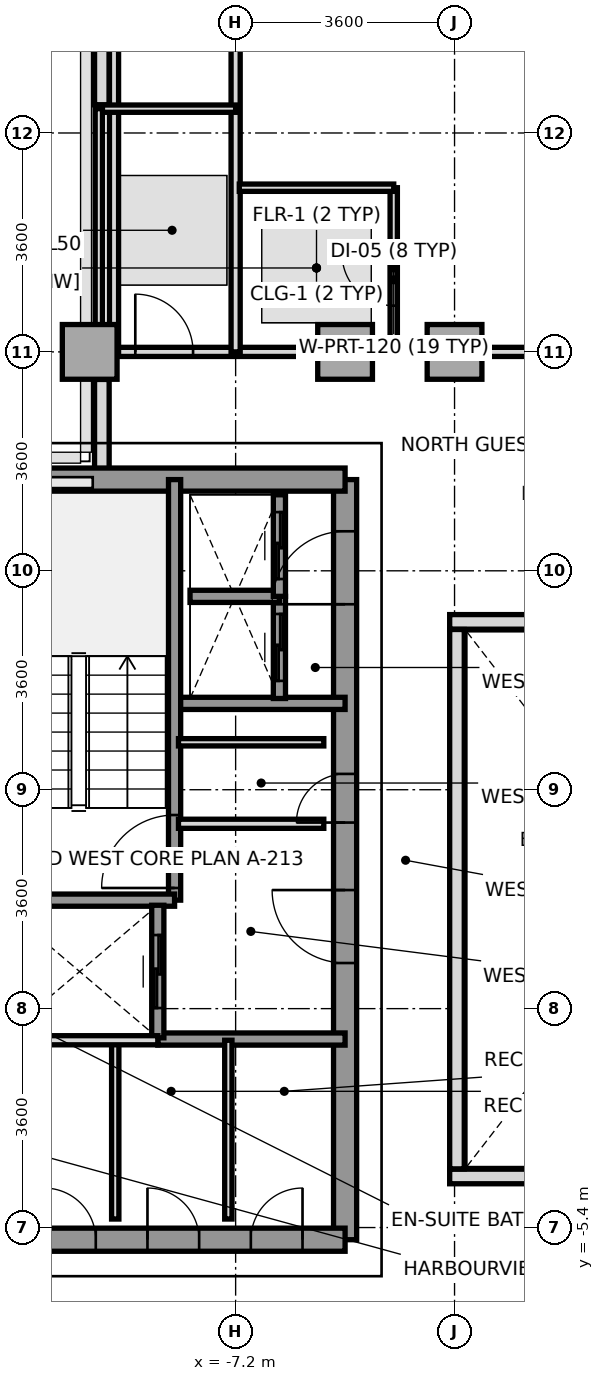
"""IFC4 building model, lengths in metres.
Left out: names, types, materials, properties, quantities, classifications, styles, units other than length and angle.
Written with IfcOpenShell. Run it as: python <this file> out.ifc"""

import sys

from ifc_helpers import new_model, si_unit, direction, frame, frame_2d, origin, origin_2d, place, context, subcontext, project, spatial, rectangle, extrude, source, transform, mapped, element, fill, save


model = new_model("IFC4")
c1 = context("Model", 3, precision=1e-05, world=origin(), true_north=direction((0.0, 1.0)))
c2 = subcontext(c1, "Body", "Model", "MODEL_VIEW")
j1 = project(units=[si_unit("LENGTHUNIT", "METRE"), si_unit("PLANEANGLEUNIT", "RADIAN")], contexts=[c1])
p1 = place(None, origin())
s1 = spatial("IfcSite", under=j1, at=p1, CompositionType="ELEMENT")
p2 = place(p1, origin())
s2 = spatial("IfcBuilding", under=s1, at=p2, CompositionType="ELEMENT")
p3 = place(p2, frame((0.0, 0.0, 184.2)))
s3 = spatial("IfcBuildingStorey", under=s2, at=p3, CompositionType="ELEMENT", Elevation=184.2)
m1 = source(origin(), c2, "Body", "SweptSolid", [
    extrude(rectangle(XDim=0.9, YDim=0.9, at=origin_2d()), origin(), (0.0, 0.0, 1.0), 3.2),
])
for number, where, z_axis, x_axis in (
    (1, (-9.6, 9.0, 0.0), (0.0, 0.0, 1.0), (1.0, 0.0, 0.0)),
    (2, (-5.4, 9.0, 0.0), (0.0, 0.0, 1.0), (1.0, 0.0, 0.0)),
    (3, (-3.6, 9.0, 0.0), (0.0, 0.0, 1.0), (1.0, 0.0, 0.0)),
):
    element("IfcColumn", number, at=place(p3, frame(where, z_axis=z_axis, x_axis=x_axis)), inside=s3, PredefinedType="COLUMN", context=c2, shape_type="MappedRepresentation", body=[
        mapped(m1, transform((0.0, 0.0, 0.0), x_axis=(1.0, 0.0, 0.0), y_axis=(0.0, 1.0, 0.0), z_axis=(0.0, 0.0, 1.0), scale=1.0)),
    ])
p4 = place(p3, frame((-9.4, 6.953, 0.0), z_axis=(0.0, 0.0, 1.0), x_axis=(0.0, 1.0, 0.0)))
e4 = element("IfcWall", 4, at=p4, inside=s3, PredefinedType="PARAPET", context=c2, shape_type="SweptSolid", body=[
    extrude(rectangle(XDim=1.594, YDim=0.24, at=frame_2d((0.797, 0.0))), origin(), (0.0, 0.0, 1.0), 1.15),
])
p5 = place(p3, frame((-9.4, 13.063, 0.0), z_axis=(0.0, 0.0, 1.0), x_axis=(0.0, 1.0, 0.0)))
e5 = element("IfcWall", 5, at=p5, inside=s3, PredefinedType="PARAPET", context=c2, shape_type="SweptSolid", body=[
    extrude(rectangle(XDim=2.54, YDim=0.24, at=frame_2d((1.27, 0.0))), origin(), (0.0, 0.0, 1.0), 1.15),
])
p6 = place(p3, frame((-5.4, -5.6, 0.0), z_axis=(0.0, 0.0, 1.0), x_axis=(0.0, 1.0, 0.0)))
e6 = element("IfcWall", 6, at=p6, inside=s3, PredefinedType="SHEAR", context=c2, shape_type="SweptSolid", body=[
    extrude(rectangle(XDim=12.5, YDim=0.38, at=frame_2d((6.25, 0.0))), origin(), (0.0, 0.0, 1.0), 3.2),
])
p7 = place(p6, frame((4.55, 0.0, 0.0)))
e7 = element("IfcOpeningElement", 7, at=p7, cuts=e6, PredefinedType="OPENING", context=c2, shape_type="SweptSolid", body=[
    extrude(rectangle(XDim=1.2, YDim=2.2, at=frame_2d((0.6, 1.1))), frame((0.0, 0.2, 0.0), z_axis=(0.0, -1.0, 0.0), x_axis=(1.0, 0.0, 0.0)), (0.0, 0.0, 1.0), 0.4),
])
p8 = place(p6, frame((10.45, 0.0, 0.0)))
e8 = element("IfcOpeningElement", 8, at=p8, cuts=e6, PredefinedType="OPENING", context=c2, shape_type="SweptSolid", body=[
    extrude(rectangle(XDim=1.2, YDim=2.2, at=frame_2d((0.6, 1.1))), frame((0.0, 0.2, 0.0), z_axis=(0.0, -1.0, 0.0), x_axis=(1.0, 0.0, 0.0)), (0.0, 0.0, 1.0), 0.4),
])
p9 = place(p6, frame((6.86, 0.0, 0.0)))
e9 = element("IfcOpeningElement", 9, at=p9, cuts=e6, PredefinedType="OPENING", context=c2, shape_type="SweptSolid", body=[
    extrude(rectangle(XDim=0.8, YDim=2.1, at=frame_2d((0.4, 1.05))), frame((0.0, 0.2, 0.0), z_axis=(0.0, -1.0, 0.0), x_axis=(1.0, 0.0, 0.0)), (0.0, 0.0, 1.0), 0.4),
])
p10 = place(p3, frame((-11.356, 6.9, 0.0), z_axis=(0.0, 0.0, 1.0), x_axis=(1.0, 0.0, 0.0)))
e10 = element("IfcWall", 10, at=p10, inside=s3, PredefinedType="SHEAR", context=c2, shape_type="SweptSolid", body=[
    extrude(rectangle(XDim=5.956, YDim=0.38, at=frame_2d((2.978, 0.0))), origin(), (0.0, 0.0, 1.0), 3.2),
])
p11 = place(p3, frame((-13.2, -5.6, 0.0), z_axis=(0.0, 0.0, 1.0), x_axis=(1.0, 0.0, 0.0)))
e11 = element("IfcWall", 11, at=p11, inside=s3, PredefinedType="SHEAR", context=c2, shape_type="SweptSolid", body=[
    extrude(rectangle(XDim=7.8, YDim=0.38, at=frame_2d((3.9, 0.0))), origin(), (0.0, 0.0, 1.0), 3.2),
])
p12 = place(p11, frame((0.28, 0.0, 0.0)))
e12 = element("IfcOpeningElement", 12, at=p12, cuts=e11, PredefinedType="OPENING", context=c2, shape_type="SweptSolid", body=[
    extrude(rectangle(XDim=0.85, YDim=2.1, at=frame_2d((0.425, 1.05))), frame((0.0, 0.2, 0.0), z_axis=(0.0, -1.0, 0.0), x_axis=(1.0, 0.0, 0.0)), (0.0, 0.0, 1.0), 0.4),
])
p13 = place(p11, frame((1.36, 0.0, 0.0)))
e13 = element("IfcOpeningElement", 13, at=p13, cuts=e11, PredefinedType="OPENING", context=c2, shape_type="SweptSolid", body=[
    extrude(rectangle(XDim=0.85, YDim=2.1, at=frame_2d((0.425, 1.05))), frame((0.0, 0.2, 0.0), z_axis=(0.0, -1.0, 0.0), x_axis=(1.0, 0.0, 0.0)), (0.0, 0.0, 1.0), 0.4),
])
p14 = place(p11, frame((2.85, 0.0, 0.0)))
e14 = element("IfcOpeningElement", 14, at=p14, cuts=e11, PredefinedType="OPENING", context=c2, shape_type="SweptSolid", body=[
    extrude(rectangle(XDim=0.85, YDim=2.1, at=frame_2d((0.425, 1.05))), frame((0.0, 0.2, 0.0), z_axis=(0.0, -1.0, 0.0), x_axis=(1.0, 0.0, 0.0)), (0.0, 0.0, 1.0), 0.4),
])
p15 = place(p11, frame((4.55, 0.0, 0.0)))
e15 = element("IfcOpeningElement", 15, at=p15, cuts=e11, PredefinedType="OPENING", context=c2, shape_type="SweptSolid", body=[
    extrude(rectangle(XDim=0.85, YDim=2.1, at=frame_2d((0.425, 1.05))), frame((0.0, 0.2, 0.0), z_axis=(0.0, -1.0, 0.0), x_axis=(1.0, 0.0, 0.0)), (0.0, 0.0, 1.0), 0.4),
])
p16 = place(p11, frame((6.25, 0.0, 0.0)))
e16 = element("IfcOpeningElement", 16, at=p16, cuts=e11, PredefinedType="OPENING", context=c2, shape_type="SweptSolid", body=[
    extrude(rectangle(XDim=0.85, YDim=2.1, at=frame_2d((0.425, 1.05))), frame((0.0, 0.2, 0.0), z_axis=(0.0, -1.0, 0.0), x_axis=(1.0, 0.0, 0.0)), (0.0, 0.0, 1.0), 0.4),
])
p17 = place(p3, frame((-8.18, 3.22, 0.0), z_axis=(0.0, 0.0, 1.0), x_axis=(1.0, 0.0, 0.0)))
e17 = element("IfcWall", 17, at=p17, inside=s3, PredefinedType="SOLIDWALL", context=c2, shape_type="SweptSolid", body=[
    extrude(rectangle(XDim=2.78, YDim=0.2, at=frame_2d((1.39, 0.0))), origin(), (0.0, 0.0, 1.0), 3.2),
])
p18 = place(p3, frame((-8.48, -2.3, 0.0), z_axis=(0.0, 0.0, 1.0), x_axis=(1.0, 0.0, 0.0)))
e18 = element("IfcWall", 18, at=p18, inside=s3, PredefinedType="SOLIDWALL", context=c2, shape_type="SweptSolid", body=[
    extrude(rectangle(XDim=3.08, YDim=0.2, at=frame_2d((1.54, 0.0))), origin(), (0.0, 0.0, 1.0), 3.2),
])
p19 = place(p3, frame((-8.204, -0.016, 0.0), z_axis=(0.0, 0.0, 1.0), x_axis=(0.0, 1.0, 0.0)))
e19 = element("IfcWall", 19, at=p19, inside=s3, PredefinedType="SOLIDWALL", context=c2, shape_type="SweptSolid", body=[
    extrude(rectangle(XDim=6.916, YDim=0.2, at=frame_2d((3.458, 0.0))), origin(), (0.0, 0.0, 1.0), 3.2),
])
p20 = place(p19, frame((0.2, 0.0, 0.0)))
e20 = element("IfcOpeningElement", 20, at=p20, cuts=e19, PredefinedType="OPENING", context=c2, shape_type="SweptSolid", body=[
    extrude(rectangle(XDim=1.2, YDim=2.2, at=frame_2d((0.6, 1.1))), frame((0.0, 0.11, 0.0), z_axis=(0.0, -1.0, 0.0), x_axis=(1.0, 0.0, 0.0)), (0.0, 0.0, 1.0), 0.22),
])
p21 = place(p3, frame((-11.356, -0.016, 0.0), z_axis=(0.0, 0.0, 1.0), x_axis=(1.0, 0.0, 0.0)))
e21 = element("IfcWall", 21, at=p21, inside=s3, PredefinedType="SOLIDWALL", context=c2, shape_type="SweptSolid", body=[
    extrude(rectangle(XDim=3.152, YDim=0.2, at=frame_2d((1.576, 0.0))), origin(), (0.0, 0.0, 1.0), 3.2),
])
p22 = place(p3, frame((-8.48, -2.28, 0.0), z_axis=(0.0, 0.0, 1.0), x_axis=(0.0, 1.0, 0.0)))
e22 = element("IfcWall", 22, at=p22, inside=s3, PredefinedType="SOLIDWALL", context=c2, shape_type="SweptSolid", body=[
    extrude(rectangle(XDim=2.18, YDim=0.2, at=frame_2d((1.09, 0.0))), origin(), (0.0, 0.0, 1.0), 3.2),
])
p23 = place(p22, frame((0.49, 0.0, 0.0)))
e23 = element("IfcOpeningElement", 23, at=p23, cuts=e22, PredefinedType="OPENING", context=c2, shape_type="SweptSolid", body=[
    extrude(rectangle(XDim=1.2, YDim=2.2, at=frame_2d((0.6, 1.1))), frame((0.0, 0.11, 0.0), z_axis=(0.0, -1.0, 0.0), x_axis=(1.0, 0.0, 0.0)), (0.0, 0.0, 1.0), 0.22),
])
p24 = place(p3, frame((-6.48, 3.3, 0.0), z_axis=(0.0, 0.0, 1.0), x_axis=(0.0, 1.0, 0.0)))
e24 = element("IfcWall", 24, at=p24, inside=s3, PredefinedType="SOLIDWALL", context=c2, shape_type="SweptSolid", body=[
    extrude(rectangle(XDim=1.68, YDim=0.2, at=frame_2d((0.84, 0.0))), origin(), (0.0, 0.0, 1.0), 3.2),
])
p25 = place(p24, frame((0.29, 0.0, 0.0)))
e25 = element("IfcOpeningElement", 25, at=p25, cuts=e24, PredefinedType="OPENING", context=c2, shape_type="SweptSolid", body=[
    extrude(rectangle(XDim=1.1, YDim=2.2, at=frame_2d((0.55, 1.1))), frame((0.0, 0.11, 0.0), z_axis=(0.0, -1.0, 0.0), x_axis=(1.0, 0.0, 0.0)), (0.0, 0.0, 1.0), 0.22),
])
p26 = place(p3, frame((-7.95, 4.98, 0.0), z_axis=(0.0, 0.0, 1.0), x_axis=(1.0, 0.0, 0.0)))
e26 = element("IfcWall", 26, at=p26, inside=s3, PredefinedType="SOLIDWALL", context=c2, shape_type="SweptSolid", body=[
    extrude(rectangle(XDim=1.47, YDim=0.2, at=frame_2d((0.735, 0.0))), origin(), (0.0, 0.0, 1.0), 3.2),
])
p27 = place(p3, frame((-6.48, 4.98, 0.0), z_axis=(0.0, 0.0, 1.0), x_axis=(0.0, 1.0, 0.0)))
e27 = element("IfcWall", 27, at=p27, inside=s3, PredefinedType="SOLIDWALL", context=c2, shape_type="SweptSolid", body=[
    extrude(rectangle(XDim=1.67, YDim=0.2, at=frame_2d((0.835, 0.0))), origin(), (0.0, 0.0, 1.0), 3.2),
])
p28 = place(p27, frame((0.285, 0.0, 0.0)))
e28 = element("IfcOpeningElement", 28, at=p28, cuts=e27, PredefinedType="OPENING", context=c2, shape_type="SweptSolid", body=[
    extrude(rectangle(XDim=1.1, YDim=2.2, at=frame_2d((0.55, 1.1))), frame((0.0, 0.11, 0.0), z_axis=(0.0, -1.0, 0.0), x_axis=(1.0, 0.0, 0.0)), (0.0, 0.0, 1.0), 0.22),
])
p29 = place(p3, frame((-8.14, 1.24, 0.0), z_axis=(0.0, 0.0, 1.0), x_axis=(1.0, 0.0, 0.0)))
e29 = element("IfcWall", 29, at=p29, inside=s3, PredefinedType="PARTITIONING", context=c2, shape_type="SweptSolid", body=[
    extrude(rectangle(XDim=2.39, YDim=0.15, at=frame_2d((1.195, 0.0))), origin(), (0.0, 0.0, 1.0), 2.3),
])
p30 = place(p3, frame((-8.14, 2.58, 0.0), z_axis=(0.0, 0.0, 1.0), x_axis=(1.0, 0.0, 0.0)))
e30 = element("IfcWall", 30, at=p30, inside=s3, PredefinedType="PARTITIONING", context=c2, shape_type="SweptSolid", body=[
    extrude(rectangle(XDim=2.39, YDim=0.12, at=frame_2d((1.195, 0.0))), origin(), (0.0, 0.0, 1.0), 2.3),
])
for number, where, z_axis, x_axis in (
    (31, (-9.18, -5.26, 0.0), (0.0, 0.0, 1.0), (0.0, 1.0, 0.0)),
    (32, (-7.32, -5.26, 0.0), (0.0, 0.0, 1.0), (0.0, 1.0, 0.0)),
):
    element("IfcWall", number, at=place(p3, frame(where, z_axis=z_axis, x_axis=x_axis)), inside=s3, PredefinedType="PARTITIONING", context=c2, shape_type="SweptSolid", body=[
        extrude(rectangle(XDim=2.94, YDim=0.12, at=frame_2d((1.47, 0.0))), origin(), (0.0, 0.0, 1.0), 3.2),
    ])
p31 = place(p3, frame((-11.04, -2.32, 0.0), z_axis=(0.0, 0.0, 1.0), x_axis=(1.0, 0.0, 0.0)))
e33 = element("IfcWall", 33, at=p31, inside=s3, PredefinedType="PARTITIONING", context=c2, shape_type="SweptSolid", body=[
    extrude(rectangle(XDim=2.56, YDim=0.15, at=frame_2d((1.28, 0.0))), origin(), (0.0, 0.0, 1.0), 3.2),
])
p32 = place(p3, frame((-9.55, 9.0, 0.0), z_axis=(0.0, 0.0, 1.0), x_axis=(1.0, 0.0, 0.0)))
e34 = element("IfcWall", 34, at=p32, inside=s3, PredefinedType="PARTITIONING", context=c2, shape_type="SweptSolid", body=[
    extrude(rectangle(XDim=19.1, YDim=0.15, at=frame_2d((9.55, 0.0))), origin(), (0.0, 0.0, 1.0), 2.75),
])
p33 = place(p32, frame((0.7, 0.0, 0.0)))
e35 = element("IfcOpeningElement", 35, at=p33, cuts=e34, PredefinedType="OPENING", context=c2, shape_type="SweptSolid", body=[
    extrude(rectangle(XDim=0.95, YDim=2.15, at=frame_2d((0.475, 1.075))), frame((0.0, 0.085, 0.0), z_axis=(0.0, -1.0, 0.0), x_axis=(1.0, 0.0, 0.0)), (0.0, 0.0, 1.0), 0.17),
])
p34 = place(p32, frame((7.15, 0.0, 0.0)))
e36 = element("IfcOpeningElement", 36, at=p34, cuts=e34, PredefinedType="OPENING", context=c2, shape_type="SweptSolid", body=[
    extrude(rectangle(XDim=0.95, YDim=2.15, at=frame_2d((0.475, 1.075))), frame((0.0, 0.085, 0.0), z_axis=(0.0, -1.0, 0.0), x_axis=(1.0, 0.0, 0.0)), (0.0, 0.0, 1.0), 0.17),
])
p35 = place(p32, frame((11.55, 0.0, 0.0)))
e37 = element("IfcOpeningElement", 37, at=p35, cuts=e34, PredefinedType="OPENING", context=c2, shape_type="SweptSolid", body=[
    extrude(rectangle(XDim=0.95, YDim=2.15, at=frame_2d((0.475, 1.075))), frame((0.0, 0.085, 0.0), z_axis=(0.0, -1.0, 0.0), x_axis=(1.0, 0.0, 0.0)), (0.0, 0.0, 1.0), 0.17),
])
p36 = place(p3, frame((-9.2, 9.0, 0.0), z_axis=(0.0, 0.0, 1.0), x_axis=(0.0, 1.0, 0.0)))
e38 = element("IfcWall", 38, at=p36, inside=s3, PredefinedType="PARTITIONING", context=c2, shape_type="SweptSolid", body=[
    extrude(rectangle(XDim=6.68, YDim=0.15, at=frame_2d((3.34, 0.0))), origin(), (0.0, 0.0, 1.0), 2.75),
])
p37 = place(p3, frame((-7.2, 9.0, 0.0), z_axis=(0.0, 0.0, 1.0), x_axis=(0.0, 1.0, 0.0)))
e39 = element("IfcWall", 39, at=p37, inside=s3, PredefinedType="PARTITIONING", context=c2, shape_type="SweptSolid", body=[
    extrude(rectangle(XDim=14.4, YDim=0.15, at=frame_2d((7.2, 0.0))), origin(), (0.0, 0.0, 1.0), 2.75),
])
p38 = place(p3, frame((-9.45, 13.0, 0.0), z_axis=(0.0, 0.0, 1.0), x_axis=(1.0, 0.0, 0.0)))
e40 = element("IfcWall", 40, at=p38, inside=s3, PredefinedType="PARTITIONING", context=c2, shape_type="SweptSolid", body=[
    extrude(rectangle(XDim=2.25, YDim=0.12, at=frame_2d((1.125, 0.0))), origin(), (0.0, 0.0, 1.0), 3.2),
])
p39 = place(p3, frame((-9.45, 9.0, 0.0), z_axis=(0.0, 0.0, 1.0), x_axis=(0.0, 1.0, 0.0)))
e41 = element("IfcWall", 41, at=p39, inside=s3, PredefinedType="PARTITIONING", context=c2, shape_type="SweptSolid", body=[
    extrude(rectangle(XDim=4.0, YDim=0.12, at=frame_2d((2.0, 0.0))), origin(), (0.0, 0.0, 1.0), 3.2),
])
p40 = place(p3, frame((-4.6, 9.06, 0.0), z_axis=(0.0, 0.0, 1.0), x_axis=(0.0, 1.0, 0.0)))
e42 = element("IfcWall", 42, at=p40, inside=s3, PredefinedType="PARTITIONING", context=c2, shape_type="SweptSolid", body=[
    extrude(rectangle(XDim=2.64, YDim=0.12, at=frame_2d((1.32, 0.0))), origin(), (0.0, 0.0, 1.0), 3.2),
])
p41 = place(p40, frame((0.7, 0.0, 0.0)))
e43 = element("IfcOpeningElement", 43, at=p41, cuts=e42, PredefinedType="OPENING", context=c2, shape_type="SweptSolid", body=[
    extrude(rectangle(XDim=0.85, YDim=2.1, at=frame_2d((0.425, 1.05))), frame((0.0, 0.07, 0.0), z_axis=(0.0, -1.0, 0.0), x_axis=(1.0, 0.0, 0.0)), (0.0, 0.0, 1.0), 0.14),
])
p42 = place(p3, frame((-7.14, 11.7, 0.0), z_axis=(0.0, 0.0, 1.0), x_axis=(1.0, 0.0, 0.0)))
e44 = element("IfcWall", 44, at=p42, inside=s3, PredefinedType="PARTITIONING", context=c2, shape_type="SweptSolid", body=[
    extrude(rectangle(XDim=2.54, YDim=0.12, at=frame_2d((1.27, 0.0))), origin(), (0.0, 0.0, 1.0), 3.2),
])
for number, where, z_axis, x_axis in (
    (45, (-3.68, -4.56, 0.0), (0.0, 0.0, 1.0), (1.0, 0.0, 0.0)),
    (46, (-3.68, 4.56, 0.0), (0.0, 0.0, 1.0), (1.0, 0.0, 0.0)),
):
    element("IfcWall", number, at=place(p3, frame(where, z_axis=z_axis, x_axis=x_axis)), inside=s3, PredefinedType="PARAPET", context=c2, shape_type="SweptSolid", body=[
        extrude(rectangle(XDim=7.36, YDim=0.24, at=frame_2d((3.68, 0.0))), origin(), (0.0, 0.0, 1.0), 1.15),
    ])
p43 = place(p3, frame((-3.56, -4.435, 0.0), z_axis=(0.0, 0.0, 1.0), x_axis=(0.0, 1.0, 0.0)))
e47 = element("IfcWall", 47, at=p43, inside=s3, PredefinedType="PARAPET", context=c2, shape_type="SweptSolid", body=[
    extrude(rectangle(XDim=8.87, YDim=0.24, at=frame_2d((4.435, 0.0))), origin(), (0.0, 0.0, 1.0), 1.15),
])
m2 = source(origin(), c2, "Body", "SweptSolid", [
    extrude(rectangle(XDim=1.2, YDim=2.2, at=frame_2d((0.6, 1.1))), frame((0.0, 0.025, 0.0), z_axis=(0.0, -1.0, 0.0), x_axis=(1.0, 0.0, 0.0)), (0.0, 0.0, 1.0), 0.05),
])
p44 = place(p20, origin())
e48 = element("IfcDoor", 48, at=p44, inside=s3, OperationType="SINGLE_SWING_LEFT", PredefinedType="DOOR", context=c2, shape_type="MappedRepresentation", body=[
    mapped(m2, transform((0.0, 0.0, 0.0), x_axis=(1.0, 0.0, 0.0), y_axis=(0.0, 1.0, 0.0), z_axis=(0.0, 0.0, 1.0), scale=1.0)),
])
fill(e20, e48)
p45 = place(p7, origin())
e49 = element("IfcDoor", 49, at=p45, inside=s3, OperationType="SINGLE_SWING_RIGHT", PredefinedType="DOOR", context=c2, shape_type="MappedRepresentation", body=[
    mapped(m2, transform((0.0, 0.0, 0.0), x_axis=(1.0, 0.0, 0.0), y_axis=(0.0, 1.0, 0.0), z_axis=(0.0, 0.0, 1.0), scale=1.0)),
])
fill(e7, e49)
p46 = place(p8, origin())
e50 = element("IfcDoor", 50, at=p46, inside=s3, OperationType="SINGLE_SWING_LEFT", PredefinedType="DOOR", context=c2, shape_type="MappedRepresentation", body=[
    mapped(m2, transform((0.0, 0.0, 0.0), x_axis=(1.0, 0.0, 0.0), y_axis=(0.0, 1.0, 0.0), z_axis=(0.0, 0.0, 1.0), scale=1.0)),
])
fill(e8, e50)
m3 = source(origin(), c2, "Body", "SweptSolid", [
    extrude(rectangle(XDim=0.8, YDim=2.1, at=frame_2d((0.4, 1.05))), frame((0.0, 0.025, 0.0), z_axis=(0.0, -1.0, 0.0), x_axis=(1.0, 0.0, 0.0)), (0.0, 0.0, 1.0), 0.05),
])
p47 = place(p9, origin())
e51 = element("IfcDoor", 51, at=p47, inside=s3, OperationType="SINGLE_SWING_LEFT", PredefinedType="DOOR", context=c2, shape_type="MappedRepresentation", body=[
    mapped(m3, transform((0.0, 0.0, 0.0), x_axis=(1.0, 0.0, 0.0), y_axis=(0.0, 1.0, 0.0), z_axis=(0.0, 0.0, 1.0), scale=1.0)),
])
fill(e9, e51)
m4 = source(origin(), c2, "Body", "SweptSolid", [
    extrude(rectangle(XDim=0.85, YDim=2.1, at=frame_2d((0.425, 1.05))), frame((0.0, 0.025, 0.0), z_axis=(0.0, -1.0, 0.0), x_axis=(1.0, 0.0, 0.0)), (0.0, 0.0, 1.0), 0.05),
])
p48 = place(p14, origin())
e52 = element("IfcDoor", 52, at=p48, inside=s3, OperationType="SINGLE_SWING_LEFT", PredefinedType="DOOR", context=c2, shape_type="MappedRepresentation", body=[
    mapped(m4, transform((0.0, 0.0, 0.0), x_axis=(1.0, 0.0, 0.0), y_axis=(0.0, 1.0, 0.0), z_axis=(0.0, 0.0, 1.0), scale=1.0)),
])
fill(e14, e52)
p49 = place(p15, origin())
e53 = element("IfcDoor", 53, at=p49, inside=s3, OperationType="SINGLE_SWING_LEFT", PredefinedType="DOOR", context=c2, shape_type="MappedRepresentation", body=[
    mapped(m4, transform((0.0, 0.0, 0.0), x_axis=(1.0, 0.0, 0.0), y_axis=(0.0, 1.0, 0.0), z_axis=(0.0, 0.0, 1.0), scale=1.0)),
])
fill(e15, e53)
p50 = place(p16, origin())
e54 = element("IfcDoor", 54, at=p50, inside=s3, OperationType="SINGLE_SWING_RIGHT", PredefinedType="DOOR", context=c2, shape_type="MappedRepresentation", body=[
    mapped(m4, transform((0.0, 0.0, 0.0), x_axis=(1.0, 0.0, 0.0), y_axis=(0.0, 1.0, 0.0), z_axis=(0.0, 0.0, 1.0), scale=1.0)),
])
fill(e16, e54)
p51 = place(p23, origin())
e55 = element("IfcDoor", 55, at=p51, inside=s3, OperationType="SLIDING_TO_RIGHT", PredefinedType="DOOR", context=c2, shape_type="MappedRepresentation", body=[
    mapped(m2, transform((0.0, 0.0, 0.0), x_axis=(1.0, 0.0, 0.0), y_axis=(0.0, 1.0, 0.0), z_axis=(0.0, 0.0, 1.0), scale=1.0)),
])
fill(e23, e55)
m5 = source(origin(), c2, "Body", "SweptSolid", [
    extrude(rectangle(XDim=1.1, YDim=2.2, at=frame_2d((0.55, 1.1))), frame((0.0, 0.025, 0.0), z_axis=(0.0, -1.0, 0.0), x_axis=(1.0, 0.0, 0.0)), (0.0, 0.0, 1.0), 0.05),
])
p52 = place(p25, origin())
e56 = element("IfcDoor", 56, at=p52, inside=s3, OperationType="SLIDING_TO_LEFT", PredefinedType="DOOR", context=c2, shape_type="MappedRepresentation", body=[
    mapped(m5, transform((0.0, 0.0, 0.0), x_axis=(1.0, 0.0, 0.0), y_axis=(0.0, 1.0, 0.0), z_axis=(0.0, 0.0, 1.0), scale=1.0)),
])
fill(e25, e56)
p53 = place(p28, origin())
e57 = element("IfcDoor", 57, at=p53, inside=s3, OperationType="SLIDING_TO_LEFT", PredefinedType="DOOR", context=c2, shape_type="MappedRepresentation", body=[
    mapped(m5, transform((0.0, 0.0, 0.0), x_axis=(1.0, 0.0, 0.0), y_axis=(0.0, 1.0, 0.0), z_axis=(0.0, 0.0, 1.0), scale=1.0)),
])
fill(e28, e57)
m6 = source(origin(), c2, "Body", "SweptSolid", [
    extrude(rectangle(XDim=0.95, YDim=2.15, at=frame_2d((0.475, 1.075))), frame((0.0, 0.025, 0.0), z_axis=(0.0, -1.0, 0.0), x_axis=(1.0, 0.0, 0.0)), (0.0, 0.0, 1.0), 0.05),
])
p54 = place(p33, origin())
e58 = element("IfcDoor", 58, at=p54, inside=s3, OperationType="SINGLE_SWING_LEFT", PredefinedType="DOOR", context=c2, shape_type="MappedRepresentation", body=[
    mapped(m6, transform((0.0, 0.0, 0.0), x_axis=(1.0, 0.0, 0.0), y_axis=(0.0, 1.0, 0.0), z_axis=(0.0, 0.0, 1.0), scale=1.0)),
])
fill(e35, e58)
p55 = place(p41, origin())
e59 = element("IfcDoor", 59, at=p55, inside=s3, OperationType="SINGLE_SWING_RIGHT", PredefinedType="DOOR", context=c2, shape_type="MappedRepresentation", body=[
    mapped(m4, transform((0.0, 0.0, 0.0), x_axis=(1.0, 0.0, 0.0), y_axis=(0.0, 1.0, 0.0), z_axis=(0.0, 0.0, 1.0), scale=1.0)),
])
fill(e43, e59)
save(model, sys.argv[1])
